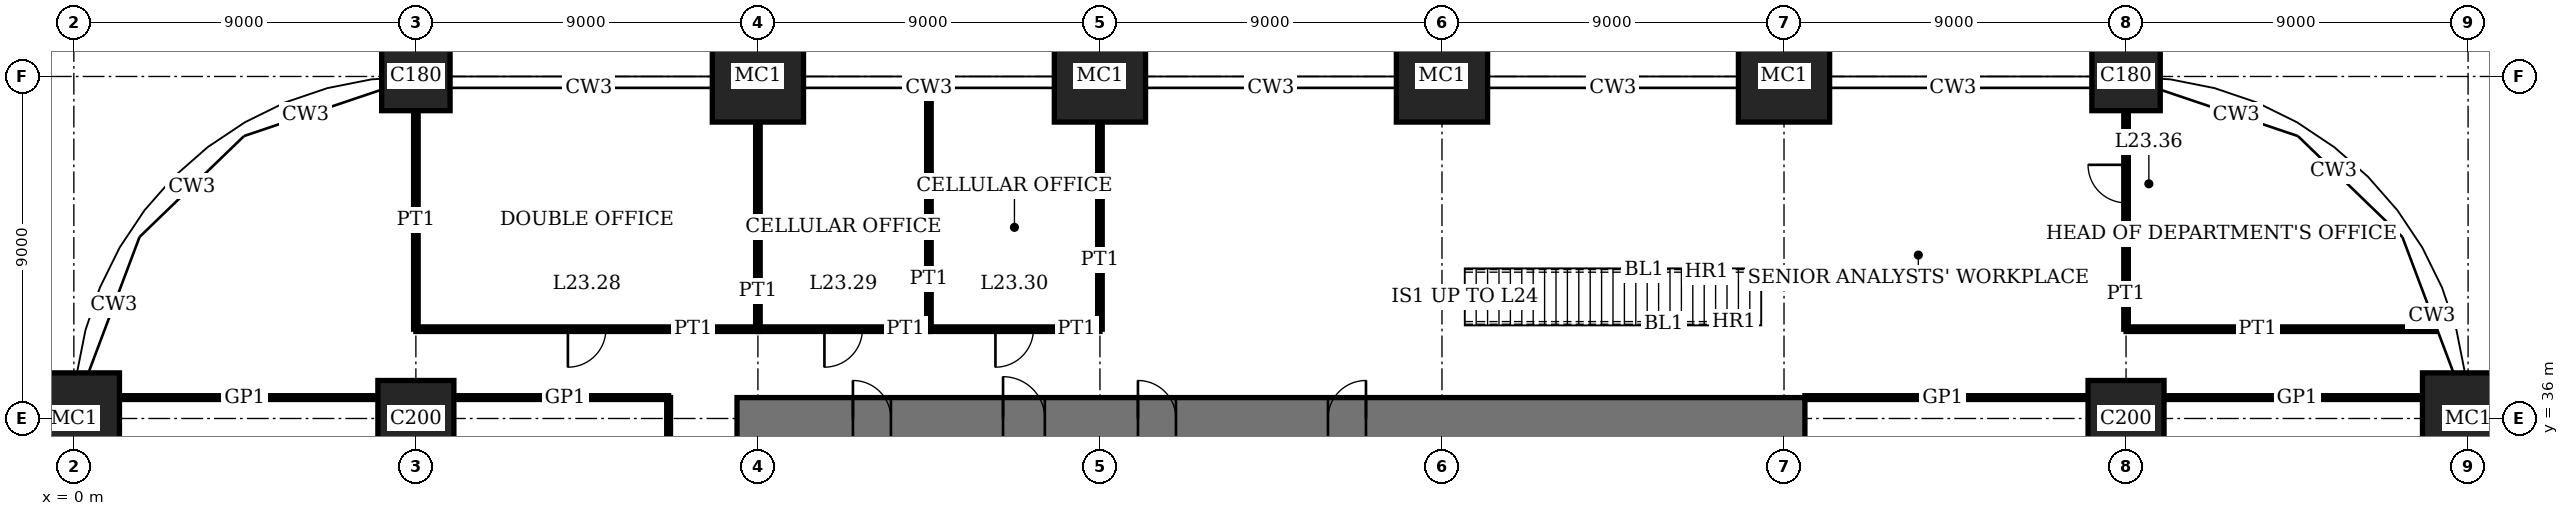
"""IFC4 building model, lengths in metres.
Left out: names, types, materials, properties, quantities, classifications, styles, units other than length and angle.
Written with IfcOpenShell. Run it as: python <this file> out.ifc"""

import sys

from ifc_helpers import new_model, si_unit, direction, frame, frame_2d, origin, origin_2d, place, context, subcontext, project, spatial, rectangle, extrude, element, fill, save


model = new_model("IFC4")
c1 = context("Model", 3, precision=1e-05, world=origin(), true_north=direction((0.0, 1.0)))
c2 = subcontext(c1, "Body", "Model", "MODEL_VIEW")
j1 = project(units=[si_unit("LENGTHUNIT", "METRE"), si_unit("PLANEANGLEUNIT", "RADIAN")], contexts=[c1])
p1 = place(None, origin())
s1 = spatial("IfcSite", under=j1, at=p1, CompositionType="ELEMENT")
p2 = place(p1, origin())
s2 = spatial("IfcBuilding", under=s1, at=p2, CompositionType="ELEMENT")
p3 = place(p2, frame((0.0, 0.0, 97.0)))
s3 = spatial("IfcBuildingStorey", under=s2, at=p3, CompositionType="ELEMENT", Elevation=97.0)
p4 = place(p3, frame((0.0, 36.0, 0.0), z_axis=(0.0, 0.0, 1.0), x_axis=(1.0, 0.0, 0.0)))
e1 = element("IfcColumn", 1, at=p4, inside=s3, PredefinedType="COLUMN", context=c2, shape_type="SweptSolid", body=[
    extrude(rectangle(XDim=2.4, YDim=2.4, at=origin_2d()), origin(), (0.0, 0.0, 1.0), 4.0),
])
p5 = place(p3, frame((9.0, 36.0, 0.0), z_axis=(0.0, 0.0, 1.0), x_axis=(1.0, 0.0, 0.0)))
e2 = element("IfcColumn", 2, at=p5, inside=s3, PredefinedType="COLUMN", context=c2, shape_type="SweptSolid", body=[
    extrude(rectangle(XDim=2.0, YDim=2.0, at=origin_2d()), origin(), (0.0, 0.0, 1.0), 4.0),
])
p6 = place(p3, frame((9.0, 45.0, 0.0), z_axis=(0.0, 0.0, 1.0), x_axis=(1.0, 0.0, 0.0)))
e3 = element("IfcColumn", 3, at=p6, inside=s3, PredefinedType="COLUMN", context=c2, shape_type="SweptSolid", body=[
    extrude(rectangle(XDim=1.8, YDim=1.8, at=origin_2d()), origin(), (0.0, 0.0, 1.0), 4.0),
])
for number, where, z_axis, x_axis in (
    (4, (18.0, 45.0, 0.0), (0.0, 0.0, 1.0), (1.0, 0.0, 0.0)),
    (5, (27.0, 45.0, 0.0), (0.0, 0.0, 1.0), (1.0, 0.0, 0.0)),
    (6, (36.0, 45.0, 0.0), (0.0, 0.0, 1.0), (1.0, 0.0, 0.0)),
    (7, (45.0, 45.0, 0.0), (0.0, 0.0, 1.0), (1.0, 0.0, 0.0)),
):
    element("IfcColumn", number, at=place(p3, frame(where, z_axis=z_axis, x_axis=x_axis)), inside=s3, PredefinedType="COLUMN", context=c2, shape_type="SweptSolid", body=[
        extrude(rectangle(XDim=2.4, YDim=2.4, at=origin_2d()), origin(), (0.0, 0.0, 1.0), 4.0),
    ])
p7 = place(p3, frame((54.0, 36.0, 0.0), z_axis=(0.0, 0.0, 1.0), x_axis=(1.0, 0.0, 0.0)))
e8 = element("IfcColumn", 8, at=p7, inside=s3, PredefinedType="COLUMN", context=c2, shape_type="SweptSolid", body=[
    extrude(rectangle(XDim=2.0, YDim=2.0, at=origin_2d()), origin(), (0.0, 0.0, 1.0), 4.0),
])
p8 = place(p3, frame((54.0, 45.0, 0.0), z_axis=(0.0, 0.0, 1.0), x_axis=(1.0, 0.0, 0.0)))
e9 = element("IfcColumn", 9, at=p8, inside=s3, PredefinedType="COLUMN", context=c2, shape_type="SweptSolid", body=[
    extrude(rectangle(XDim=1.8, YDim=1.8, at=origin_2d()), origin(), (0.0, 0.0, 1.0), 4.0),
])
p9 = place(p3, frame((63.0, 36.0, 0.0), z_axis=(0.0, 0.0, 1.0), x_axis=(1.0, 0.0, 0.0)))
e10 = element("IfcColumn", 10, at=p9, inside=s3, PredefinedType="COLUMN", context=c2, shape_type="SweptSolid", body=[
    extrude(rectangle(XDim=2.4, YDim=2.4, at=origin_2d()), origin(), (0.0, 0.0, 1.0), 4.0),
])
p10 = place(p3, frame((45.55, 36.0, 0.0), z_axis=(0.0, 0.0, 1.0), x_axis=(-1.0, 0.0, 0.0)))
e11 = element("IfcWall", 11, at=p10, inside=s3, PredefinedType="SHEAR", context=c2, shape_type="SweptSolid", body=[
    extrude(rectangle(XDim=28.1, YDim=1.1, at=frame_2d((14.05, 0.0))), origin(), (0.0, 0.0, 1.0), 4.0),
])
p11 = place(p10, frame((11.55, 0.0, 0.0)))
e12 = element("IfcOpeningElement", 12, at=p11, cuts=e11, PredefinedType="OPENING", context=c2, shape_type="SweptSolid", body=[
    extrude(rectangle(XDim=1.0, YDim=2.4, at=frame_2d((0.5, 1.2))), frame((0.0, 0.56, 0.0), z_axis=(0.0, -1.0, 0.0), x_axis=(1.0, 0.0, 0.0)), (0.0, 0.0, 1.0), 1.12),
])
p12 = place(p10, frame((16.55, 0.0, 0.0)))
e13 = element("IfcOpeningElement", 13, at=p12, cuts=e11, PredefinedType="OPENING", context=c2, shape_type="SweptSolid", body=[
    extrude(rectangle(XDim=1.0, YDim=2.4, at=frame_2d((0.5, 1.2))), frame((0.0, 0.56, 0.0), z_axis=(0.0, -1.0, 0.0), x_axis=(1.0, 0.0, 0.0)), (0.0, 0.0, 1.0), 1.12),
])
p13 = place(p10, frame((20.0, 0.0, 0.0)))
e14 = element("IfcOpeningElement", 14, at=p13, cuts=e11, PredefinedType="OPENING", context=c2, shape_type="SweptSolid", body=[
    extrude(rectangle(XDim=1.1, YDim=2.4, at=frame_2d((0.55, 1.2))), frame((0.0, 0.56, 0.0), z_axis=(0.0, -1.0, 0.0), x_axis=(1.0, 0.0, 0.0)), (0.0, 0.0, 1.0), 1.12),
])
p14 = place(p10, frame((24.05, 0.0, 0.0)))
e15 = element("IfcOpeningElement", 15, at=p14, cuts=e11, PredefinedType="OPENING", context=c2, shape_type="SweptSolid", body=[
    extrude(rectangle(XDim=1.0, YDim=2.4, at=frame_2d((0.5, 1.2))), frame((0.0, 0.56, 0.0), z_axis=(0.0, -1.0, 0.0), x_axis=(1.0, 0.0, 0.0)), (0.0, 0.0, 1.0), 1.12),
])
p15 = place(p3, frame((1.2, 36.55, 0.0), z_axis=(0.0, 0.0, 1.0), x_axis=(1.0, 0.0, 0.0)))
e16 = element("IfcWall", 16, at=p15, inside=s3, PredefinedType="PARTITIONING", context=c2, shape_type="SweptSolid", body=[
    extrude(rectangle(XDim=6.8, YDim=0.1, at=frame_2d((3.4, 0.0))), origin(), (0.0, 0.0, 1.0), 3.75),
])
p16 = place(p3, frame((10.0, 36.55, 0.0), z_axis=(0.0, 0.0, 1.0), x_axis=(1.0, 0.0, 0.0)))
e17 = element("IfcWall", 17, at=p16, inside=s3, PredefinedType="PARTITIONING", context=c2, shape_type="SweptSolid", body=[
    extrude(rectangle(XDim=5.65, YDim=0.1, at=frame_2d((2.825, 0.0))), origin(), (0.0, 0.0, 1.0), 3.75),
])
p17 = place(p3, frame((45.55, 36.55, 0.0), z_axis=(0.0, 0.0, 1.0), x_axis=(1.0, 0.0, 0.0)))
e18 = element("IfcWall", 18, at=p17, inside=s3, PredefinedType="PARTITIONING", context=c2, shape_type="SweptSolid", body=[
    extrude(rectangle(XDim=7.45, YDim=0.1, at=frame_2d((3.725, 0.0))), origin(), (0.0, 0.0, 1.0), 3.75),
])
p18 = place(p3, frame((55.0, 36.55, 0.0), z_axis=(0.0, 0.0, 1.0), x_axis=(1.0, 0.0, 0.0)))
e19 = element("IfcWall", 19, at=p18, inside=s3, PredefinedType="PARTITIONING", context=c2, shape_type="SweptSolid", body=[
    extrude(rectangle(XDim=6.8, YDim=0.1, at=frame_2d((3.4, 0.0))), origin(), (0.0, 0.0, 1.0), 3.75),
])
p19 = place(p3, frame((9.0, 38.35, 0.0), z_axis=(0.0, 0.0, 1.0), x_axis=(1.0, 0.0, 0.0)))
e20 = element("IfcWall", 20, at=p19, inside=s3, PredefinedType="PARTITIONING", context=c2, shape_type="SweptSolid", body=[
    extrude(rectangle(XDim=9.0, YDim=0.12, at=frame_2d((4.5, 0.0))), origin(), (0.0, 0.0, 1.0), 3.75),
])
p20 = place(p19, frame((4.0, 0.0, 0.0)))
e21 = element("IfcOpeningElement", 21, at=p20, cuts=e20, PredefinedType="OPENING", context=c2, shape_type="SweptSolid", body=[
    extrude(rectangle(XDim=1.0, YDim=2.4, at=frame_2d((0.5, 1.2))), frame((0.0, 0.07, 0.0), z_axis=(0.0, -1.0, 0.0), x_axis=(1.0, 0.0, 0.0)), (0.0, 0.0, 1.0), 0.14),
])
p21 = place(p3, frame((18.0, 38.35, 0.0), z_axis=(0.0, 0.0, 1.0), x_axis=(1.0, 0.0, 0.0)))
e22 = element("IfcWall", 22, at=p21, inside=s3, PredefinedType="PARTITIONING", context=c2, shape_type="SweptSolid", body=[
    extrude(rectangle(XDim=4.5, YDim=0.12, at=frame_2d((2.25, 0.0))), origin(), (0.0, 0.0, 1.0), 3.75),
])
p22 = place(p21, frame((1.75, 0.0, 0.0)))
e23 = element("IfcOpeningElement", 23, at=p22, cuts=e22, PredefinedType="OPENING", context=c2, shape_type="SweptSolid", body=[
    extrude(rectangle(XDim=1.0, YDim=2.4, at=frame_2d((0.5, 1.2))), frame((0.0, 0.07, 0.0), z_axis=(0.0, -1.0, 0.0), x_axis=(1.0, 0.0, 0.0)), (0.0, 0.0, 1.0), 0.14),
])
p23 = place(p3, frame((22.5, 38.35, 0.0), z_axis=(0.0, 0.0, 1.0), x_axis=(1.0, 0.0, 0.0)))
e24 = element("IfcWall", 24, at=p23, inside=s3, PredefinedType="PARTITIONING", context=c2, shape_type="SweptSolid", body=[
    extrude(rectangle(XDim=4.5, YDim=0.12, at=frame_2d((2.25, 0.0))), origin(), (0.0, 0.0, 1.0), 3.75),
])
p24 = place(p23, frame((1.75, 0.0, 0.0)))
e25 = element("IfcOpeningElement", 25, at=p24, cuts=e24, PredefinedType="OPENING", context=c2, shape_type="SweptSolid", body=[
    extrude(rectangle(XDim=1.0, YDim=2.4, at=frame_2d((0.5, 1.2))), frame((0.0, 0.07, 0.0), z_axis=(0.0, -1.0, 0.0), x_axis=(1.0, 0.0, 0.0)), (0.0, 0.0, 1.0), 0.14),
])
p25 = place(p3, frame((54.0, 38.35, 0.0), z_axis=(0.0, 0.0, 1.0), x_axis=(1.0, 0.0, 0.0)))
e26 = element("IfcWall", 26, at=p25, inside=s3, PredefinedType="PARTITIONING", context=c2, shape_type="SweptSolid", body=[
    extrude(rectangle(XDim=8.145, YDim=0.12, at=frame_2d((4.072, 0.0))), origin(), (0.0, 0.0, 1.0), 3.75),
])
p26 = place(p3, frame((9.0, 38.35, 0.0), z_axis=(0.0, 0.0, 1.0), x_axis=(0.0, 1.0, 0.0)))
e27 = element("IfcWall", 27, at=p26, inside=s3, PredefinedType="PARTITIONING", context=c2, shape_type="SweptSolid", body=[
    extrude(rectangle(XDim=5.75, YDim=0.12, at=frame_2d((2.875, 0.0))), origin(), (0.0, 0.0, 1.0), 3.05),
])
p27 = place(p3, frame((15.65, 27.0, 0.0), z_axis=(0.0, 0.0, 1.0), x_axis=(0.0, 1.0, 0.0)))
e28 = element("IfcWall", 28, at=p27, inside=s3, PredefinedType="PARTITIONING", context=c2, shape_type="SweptSolid", body=[
    extrude(rectangle(XDim=9.55, YDim=0.1, at=frame_2d((4.775, 0.0))), origin(), (0.0, 0.0, 1.0), 3.75),
])
p28 = place(p27, frame((4.275, 0.0, 0.0)))
e29 = element("IfcOpeningElement", 29, at=p28, cuts=e28, PredefinedType="OPENING", context=c2, shape_type="SweptSolid", body=[
    extrude(rectangle(XDim=1.0, YDim=2.4, at=frame_2d((0.5, 1.2))), frame((0.0, 0.06, 0.0), z_axis=(0.0, -1.0, 0.0), x_axis=(1.0, 0.0, 0.0)), (0.0, 0.0, 1.0), 0.12),
])
p29 = place(p3, frame((18.0, 38.35, 0.0), z_axis=(0.0, 0.0, 1.0), x_axis=(0.0, 1.0, 0.0)))
e30 = element("IfcWall", 30, at=p29, inside=s3, PredefinedType="PARTITIONING", context=c2, shape_type="SweptSolid", body=[
    extrude(rectangle(XDim=5.45, YDim=0.12, at=frame_2d((2.725, 0.0))), origin(), (0.0, 0.0, 1.0), 3.05),
])
p30 = place(p3, frame((22.5, 38.35, 0.0), z_axis=(0.0, 0.0, 1.0), x_axis=(0.0, 1.0, 0.0)))
e31 = element("IfcWall", 31, at=p30, inside=s3, PredefinedType="PARTITIONING", context=c2, shape_type="SweptSolid", body=[
    extrude(rectangle(XDim=6.34, YDim=0.12, at=frame_2d((3.17, 0.0))), origin(), (0.0, 0.0, 1.0), 3.75),
])
p31 = place(p3, frame((27.0, 38.35, 0.0), z_axis=(0.0, 0.0, 1.0), x_axis=(0.0, 1.0, 0.0)))
e32 = element("IfcWall", 32, at=p31, inside=s3, PredefinedType="PARTITIONING", context=c2, shape_type="SweptSolid", body=[
    extrude(rectangle(XDim=5.45, YDim=0.12, at=frame_2d((2.725, 0.0))), origin(), (0.0, 0.0, 1.0), 3.05),
])
p32 = place(p3, frame((54.0, 38.35, 0.0), z_axis=(0.0, 0.0, 1.0), x_axis=(0.0, 1.0, 0.0)))
e33 = element("IfcWall", 33, at=p32, inside=s3, PredefinedType="PARTITIONING", context=c2, shape_type="SweptSolid", body=[
    extrude(rectangle(XDim=5.75, YDim=0.12, at=frame_2d((2.875, 0.0))), origin(), (0.0, 0.0, 1.0), 3.05),
])
p33 = place(p32, frame((3.325, 0.0, 0.0)))
e34 = element("IfcOpeningElement", 34, at=p33, cuts=e33, PredefinedType="OPENING", context=c2, shape_type="SweptSolid", body=[
    extrude(rectangle(XDim=1.0, YDim=2.4, at=frame_2d((0.5, 1.2))), frame((0.0, 0.07, 0.0), z_axis=(0.0, -1.0, 0.0), x_axis=(1.0, 0.0, 0.0)), (0.0, 0.0, 1.0), 0.14),
])
p34 = place(p11, origin())
e35 = element("IfcDoor", 35, at=p34, inside=s3, OperationType="SINGLE_SWING_LEFT", PredefinedType="DOOR", context=c2, shape_type="SweptSolid", body=[
    extrude(rectangle(XDim=1.0, YDim=2.4, at=frame_2d((0.5, 1.2))), frame((0.0, 0.025, 0.0), z_axis=(0.0, -1.0, 0.0), x_axis=(1.0, 0.0, 0.0)), (0.0, 0.0, 1.0), 0.05),
    extrude(rectangle(XDim=0.04, YDim=2.4, at=frame_2d((0.02, 1.2))), frame((0.0, 0.4, 0.0), z_axis=(0.0, -1.0, 0.0), x_axis=(1.0, 0.0, 0.0)), (0.0, 0.0, 1.0), 0.8),
    extrude(rectangle(XDim=0.04, YDim=2.4, at=frame_2d((0.98, 1.2))), frame((0.0, 0.4, 0.0), z_axis=(0.0, -1.0, 0.0), x_axis=(1.0, 0.0, 0.0)), (0.0, 0.0, 1.0), 0.8),
    extrude(rectangle(XDim=1.0, YDim=0.04, at=frame_2d((0.5, 2.38))), frame((0.0, 0.4, 0.0), z_axis=(0.0, -1.0, 0.0), x_axis=(1.0, 0.0, 0.0)), (0.0, 0.0, 1.0), 0.8),
])
fill(e12, e35)
p35 = place(p12, origin())
e36 = element("IfcDoor", 36, at=p35, inside=s3, OperationType="SINGLE_SWING_RIGHT", PredefinedType="DOOR", context=c2, shape_type="SweptSolid", body=[
    extrude(rectangle(XDim=1.0, YDim=2.4, at=frame_2d((0.5, 1.2))), frame((0.0, 0.025, 0.0), z_axis=(0.0, -1.0, 0.0), x_axis=(1.0, 0.0, 0.0)), (0.0, 0.0, 1.0), 0.05),
    extrude(rectangle(XDim=0.04, YDim=2.4, at=frame_2d((0.02, 1.2))), frame((0.0, 0.4, 0.0), z_axis=(0.0, -1.0, 0.0), x_axis=(1.0, 0.0, 0.0)), (0.0, 0.0, 1.0), 0.8),
    extrude(rectangle(XDim=0.04, YDim=2.4, at=frame_2d((0.98, 1.2))), frame((0.0, 0.4, 0.0), z_axis=(0.0, -1.0, 0.0), x_axis=(1.0, 0.0, 0.0)), (0.0, 0.0, 1.0), 0.8),
    extrude(rectangle(XDim=1.0, YDim=0.04, at=frame_2d((0.5, 2.38))), frame((0.0, 0.4, 0.0), z_axis=(0.0, -1.0, 0.0), x_axis=(1.0, 0.0, 0.0)), (0.0, 0.0, 1.0), 0.8),
])
fill(e13, e36)
p36 = place(p13, origin())
e37 = element("IfcDoor", 37, at=p36, inside=s3, OperationType="SINGLE_SWING_RIGHT", PredefinedType="DOOR", context=c2, shape_type="SweptSolid", body=[
    extrude(rectangle(XDim=1.1, YDim=2.4, at=frame_2d((0.55, 1.2))), frame((0.0, 0.025, 0.0), z_axis=(0.0, -1.0, 0.0), x_axis=(1.0, 0.0, 0.0)), (0.0, 0.0, 1.0), 0.05),
    extrude(rectangle(XDim=0.04, YDim=2.4, at=frame_2d((0.02, 1.2))), frame((0.0, 0.44, 0.0), z_axis=(0.0, -1.0, 0.0), x_axis=(1.0, 0.0, 0.0)), (0.0, 0.0, 1.0), 0.88),
    extrude(rectangle(XDim=0.04, YDim=2.4, at=frame_2d((1.08, 1.2))), frame((0.0, 0.44, 0.0), z_axis=(0.0, -1.0, 0.0), x_axis=(1.0, 0.0, 0.0)), (0.0, 0.0, 1.0), 0.88),
    extrude(rectangle(XDim=1.1, YDim=0.04, at=frame_2d((0.55, 2.38))), frame((0.0, 0.44, 0.0), z_axis=(0.0, -1.0, 0.0), x_axis=(1.0, 0.0, 0.0)), (0.0, 0.0, 1.0), 0.88),
])
fill(e14, e37)
p37 = place(p14, origin())
e38 = element("IfcDoor", 38, at=p37, inside=s3, OperationType="SINGLE_SWING_RIGHT", PredefinedType="DOOR", context=c2, shape_type="SweptSolid", body=[
    extrude(rectangle(XDim=1.0, YDim=2.4, at=frame_2d((0.5, 1.2))), frame((0.0, 0.025, 0.0), z_axis=(0.0, -1.0, 0.0), x_axis=(1.0, 0.0, 0.0)), (0.0, 0.0, 1.0), 0.05),
    extrude(rectangle(XDim=0.04, YDim=2.4, at=frame_2d((0.02, 1.2))), frame((0.0, 0.4, 0.0), z_axis=(0.0, -1.0, 0.0), x_axis=(1.0, 0.0, 0.0)), (0.0, 0.0, 1.0), 0.8),
    extrude(rectangle(XDim=0.04, YDim=2.4, at=frame_2d((0.98, 1.2))), frame((0.0, 0.4, 0.0), z_axis=(0.0, -1.0, 0.0), x_axis=(1.0, 0.0, 0.0)), (0.0, 0.0, 1.0), 0.8),
    extrude(rectangle(XDim=1.0, YDim=0.04, at=frame_2d((0.5, 2.38))), frame((0.0, 0.4, 0.0), z_axis=(0.0, -1.0, 0.0), x_axis=(1.0, 0.0, 0.0)), (0.0, 0.0, 1.0), 0.8),
])
fill(e15, e38)
p38 = place(p20, origin())
e39 = element("IfcDoor", 39, at=p38, inside=s3, OperationType="SINGLE_SWING_LEFT", PredefinedType="DOOR", context=c2, shape_type="SweptSolid", body=[
    extrude(rectangle(XDim=1.0, YDim=2.4, at=frame_2d((0.5, 1.2))), frame((0.0, 0.025, 0.0), z_axis=(0.0, -1.0, 0.0), x_axis=(1.0, 0.0, 0.0)), (0.0, 0.0, 1.0), 0.05),
])
fill(e21, e39)
p39 = place(p22, origin())
e40 = element("IfcDoor", 40, at=p39, inside=s3, OperationType="SINGLE_SWING_LEFT", PredefinedType="DOOR", context=c2, shape_type="SweptSolid", body=[
    extrude(rectangle(XDim=1.0, YDim=2.4, at=frame_2d((0.5, 1.2))), frame((0.0, 0.025, 0.0), z_axis=(0.0, -1.0, 0.0), x_axis=(1.0, 0.0, 0.0)), (0.0, 0.0, 1.0), 0.05),
])
fill(e23, e40)
p40 = place(p24, origin())
e41 = element("IfcDoor", 41, at=p40, inside=s3, OperationType="SINGLE_SWING_LEFT", PredefinedType="DOOR", context=c2, shape_type="SweptSolid", body=[
    extrude(rectangle(XDim=1.0, YDim=2.4, at=frame_2d((0.5, 1.2))), frame((0.0, 0.025, 0.0), z_axis=(0.0, -1.0, 0.0), x_axis=(1.0, 0.0, 0.0)), (0.0, 0.0, 1.0), 0.05),
])
fill(e25, e41)
p41 = place(p33, origin())
e42 = element("IfcDoor", 42, at=p41, inside=s3, OperationType="SINGLE_SWING_LEFT", PredefinedType="DOOR", context=c2, shape_type="SweptSolid", body=[
    extrude(rectangle(XDim=1.0, YDim=2.4, at=frame_2d((0.5, 1.2))), frame((0.0, 0.025, 0.0), z_axis=(0.0, -1.0, 0.0), x_axis=(1.0, 0.0, 0.0)), (0.0, 0.0, 1.0), 0.05),
])
fill(e34, e42)
save(model, sys.argv[1])
